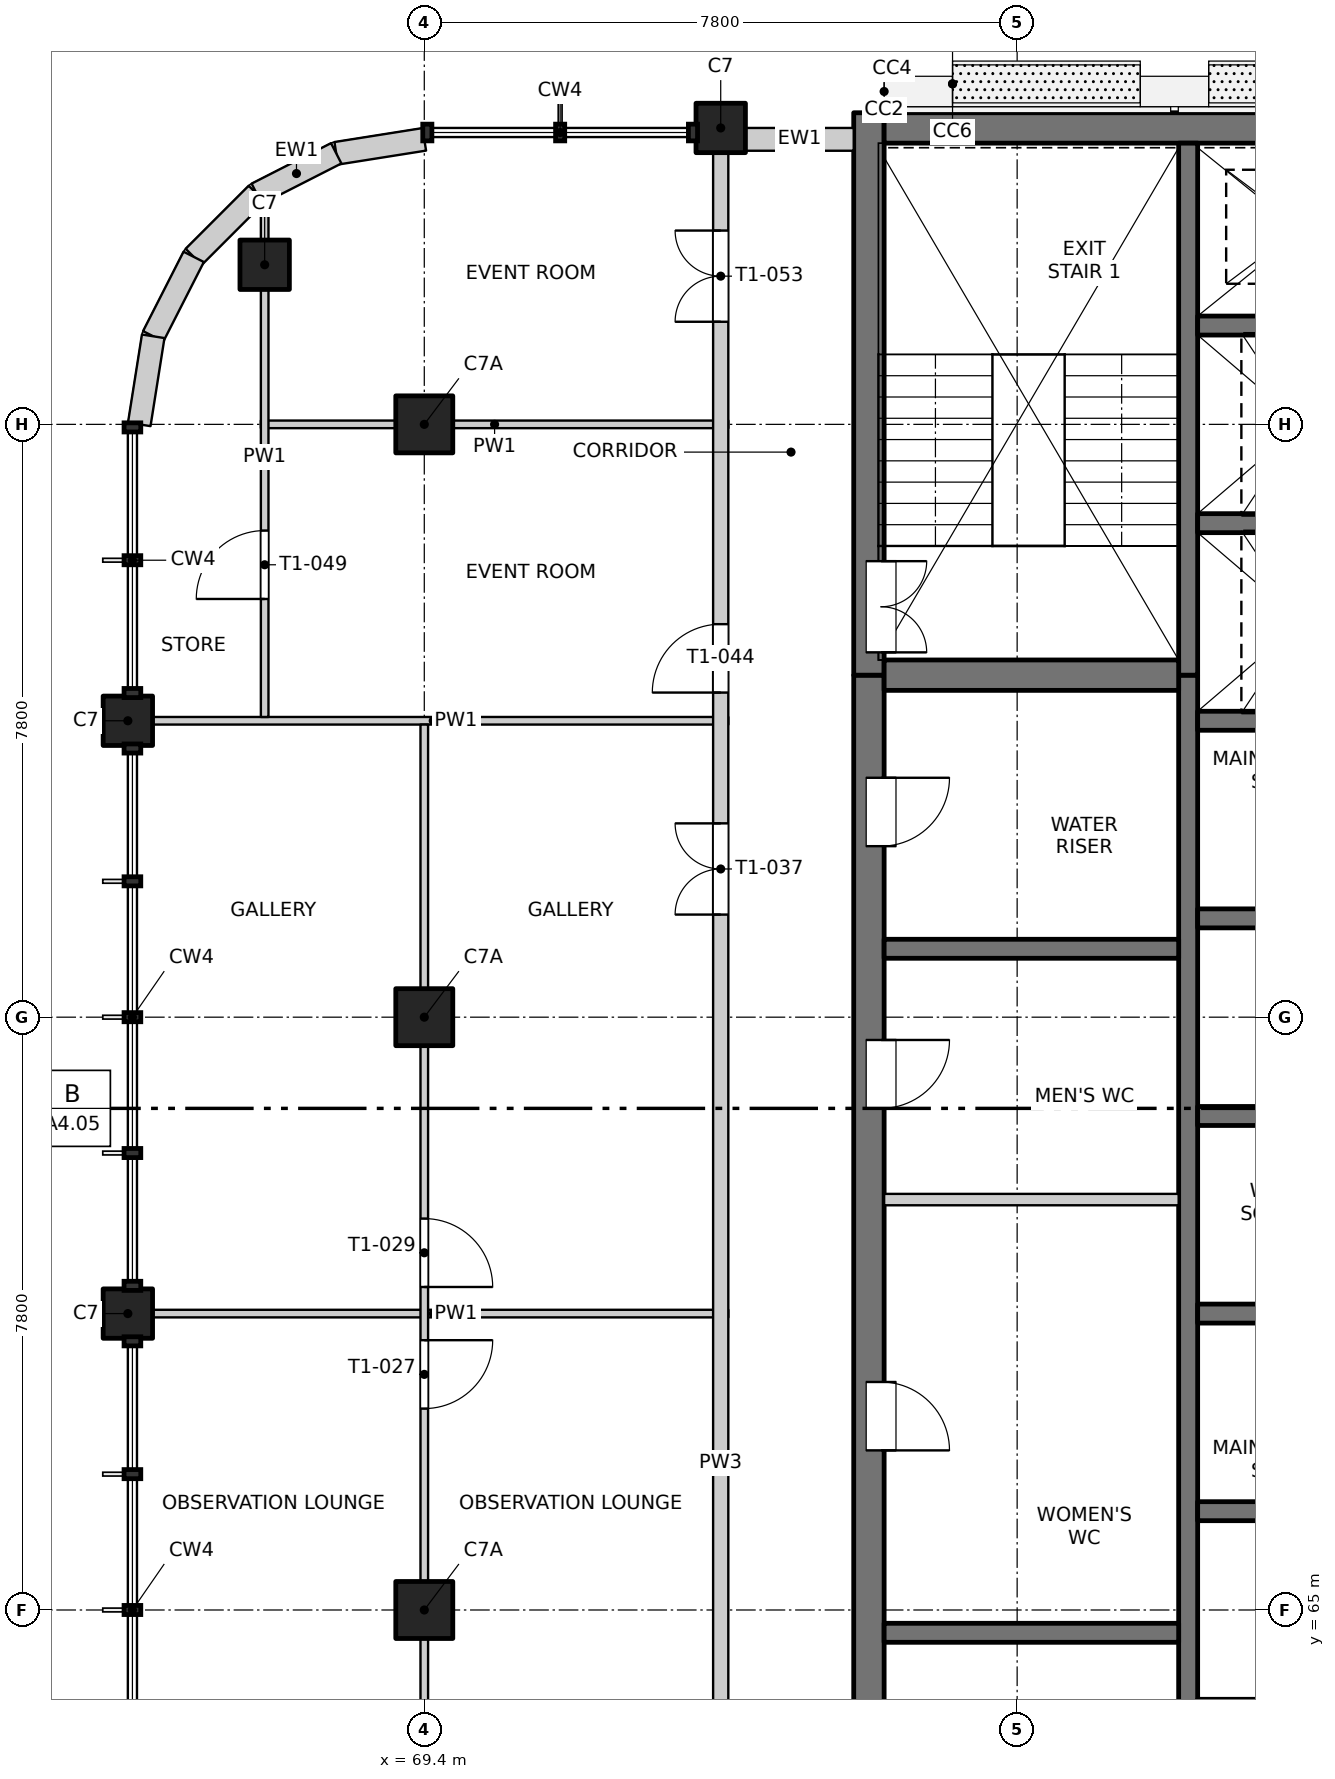
"""IFC4 building model, lengths in metres.
Left out: names, types, materials, properties, quantities, classifications, styles, units other than length and angle.
Written with IfcOpenShell. Run it as: python <this file> out.ifc"""

import sys

from ifc_helpers import new_model, si_unit, direction, frame, frame_2d, origin, origin_2d, place, context, subcontext, project, spatial, rectangle, extrude, element, fill, save


model = new_model("IFC4")
c1 = context("Model", 3, precision=1e-05, world=origin(), true_north=direction((0.0, 1.0)))
c2 = subcontext(c1, "Body", "Model", "MODEL_VIEW")
j1 = project(units=[si_unit("LENGTHUNIT", "METRE"), si_unit("PLANEANGLEUNIT", "RADIAN")], contexts=[c1])
p1 = place(None, origin())
s1 = spatial("IfcSite", under=j1, at=p1, CompositionType="ELEMENT")
p2 = place(p1, origin())
s2 = spatial("IfcBuilding", under=s1, at=p2, CompositionType="ELEMENT")
p3 = place(p2, frame((0.0, 0.0, 263.0)))
s3 = spatial("IfcBuildingStorey", under=s2, at=p3, CompositionType="ELEMENT", Elevation=263.0)
for number, where, z_axis, x_axis in (
    (1, (67.3, 82.7, -0.25), (0.0, 0.0, 1.0), (1.0, 0.0, 0.0)),
    (2, (73.3, 84.5, -0.25), (0.0, 0.0, 1.0), (1.0, 0.0, 0.0)),
    (3, (65.5, 68.9, -0.25), (0.0, 0.0, 1.0), (1.0, 0.0, 0.0)),
    (4, (65.5, 76.7, -0.25), (0.0, 0.0, 1.0), (1.0, 0.0, 0.0)),
):
    element("IfcColumn", number, at=place(p3, frame(where, z_axis=z_axis, x_axis=x_axis)), inside=s3, PredefinedType="COLUMN", context=c2, shape_type="SweptSolid", body=[
        extrude(rectangle(XDim=0.65, YDim=0.65, at=origin_2d()), origin(), (0.0, 0.0, 1.0), 3.35),
    ])
for number, where, z_axis, x_axis in (
    (5, (69.4, 65.0, -0.25), (0.0, 0.0, 1.0), (1.0, 0.0, 0.0)),
    (6, (69.4, 72.8, -0.25), (0.0, 0.0, 1.0), (1.0, 0.0, 0.0)),
    (7, (69.4, 80.6, -0.25), (0.0, 0.0, 1.0), (1.0, 0.0, 0.0)),
):
    element("IfcColumn", number, at=place(p3, frame(where, z_axis=z_axis, x_axis=x_axis)), inside=s3, PredefinedType="COLUMN", context=c2, shape_type="SweptSolid", body=[
        extrude(rectangle(XDim=0.75, YDim=0.75, at=origin_2d()), origin(), (0.0, 0.0, 1.0), 3.35),
    ])
p4 = place(p3, frame((75.25, 55.05, -0.25), z_axis=(0.0, 0.0, 1.0), x_axis=(0.0, 1.0, 0.0)))
e8 = element("IfcWall", 8, at=p4, inside=s3, PredefinedType="SOLIDWALL", context=c2, shape_type="SweptSolid", body=[
    extrude(rectangle(XDim=22.25, YDim=0.4, at=frame_2d((11.125, 0.0))), origin(), (0.0, 0.0, 1.0), 3.35),
])
p5 = place(p4, frame((7.4, 0.0, 0.25)))
e9 = element("IfcOpeningElement", 9, at=p5, cuts=e8, PredefinedType="OPENING", context=c2, shape_type="SweptSolid", body=[
    extrude(rectangle(XDim=0.9, YDim=2.1, at=frame_2d((0.45, 1.05))), frame((0.0, 0.21, 0.0), z_axis=(0.0, -1.0, 0.0), x_axis=(1.0, 0.0, 0.0)), (0.0, 0.0, 1.0), 0.42),
])
p6 = place(p4, frame((12.05, 0.0, 0.25)))
e10 = element("IfcOpeningElement", 10, at=p6, cuts=e8, PredefinedType="OPENING", context=c2, shape_type="SweptSolid", body=[
    extrude(rectangle(XDim=0.9, YDim=2.1, at=frame_2d((0.45, 1.05))), frame((0.0, 0.21, 0.0), z_axis=(0.0, -1.0, 0.0), x_axis=(1.0, 0.0, 0.0)), (0.0, 0.0, 1.0), 0.42),
])
p7 = place(p4, frame((16.55, 0.0, 0.25)))
e11 = element("IfcOpeningElement", 11, at=p7, cuts=e8, PredefinedType="OPENING", context=c2, shape_type="SweptSolid", body=[
    extrude(rectangle(XDim=0.9, YDim=2.1, at=frame_2d((0.45, 1.05))), frame((0.0, 0.21, 0.0), z_axis=(0.0, -1.0, 0.0), x_axis=(1.0, 0.0, 0.0)), (0.0, 0.0, 1.0), 0.42),
])
p8 = place(p4, frame((20.0, 0.0, 0.25)))
e12 = element("IfcOpeningElement", 12, at=p8, cuts=e8, PredefinedType="OPENING", context=c2, shape_type="SweptSolid", body=[
    extrude(rectangle(XDim=0.9, YDim=2.1, at=frame_2d((0.45, 1.05))), frame((0.0, 0.21, 0.0), z_axis=(0.0, -1.0, 0.0), x_axis=(1.0, 0.0, 0.0)), (0.0, 0.0, 1.0), 0.42),
])
p9 = place(p3, frame((75.25, 77.3, -0.25), z_axis=(0.0, 0.0, 1.0), x_axis=(0.0, 1.0, 0.0)))
e13 = element("IfcWall", 13, at=p9, inside=s3, PredefinedType="SOLIDWALL", context=c2, shape_type="SweptSolid", body=[
    extrude(rectangle(XDim=7.4, YDim=0.4, at=frame_2d((3.7, 0.0))), origin(), (0.0, 0.0, 1.0), 3.35),
])
p10 = place(p9, frame((0.3, 0.0, 0.25)))
e14 = element("IfcOpeningElement", 14, at=p10, cuts=e13, PredefinedType="OPENING", context=c2, shape_type="SweptSolid", body=[
    extrude(rectangle(XDim=1.2, YDim=2.1, at=frame_2d((0.6, 1.05))), frame((0.0, 0.21, 0.0), z_axis=(0.0, -1.0, 0.0), x_axis=(1.0, 0.0, 0.0)), (0.0, 0.0, 1.0), 0.42),
])
p11 = place(p3, frame((75.45, 84.5, -0.25), z_axis=(0.0, 0.0, 1.0), x_axis=(1.0, 0.0, 0.0)))
e15 = element("IfcWall", 15, at=p11, inside=s3, PredefinedType="SOLIDWALL", context=c2, shape_type="SweptSolid", body=[
    extrude(rectangle(XDim=19.1, YDim=0.4, at=frame_2d((9.55, 0.0))), origin(), (0.0, 0.0, 1.0), 3.35),
])
p12 = place(p3, frame((79.45, 60.975, -0.25), z_axis=(0.0, 0.0, 1.0), x_axis=(0.0, 1.0, 0.0)))
e16 = element("IfcWall", 16, at=p12, inside=s3, PredefinedType="SOLIDWALL", context=c2, shape_type="SweptSolid", body=[
    extrude(rectangle(XDim=16.325, YDim=0.25, at=frame_2d((8.163, 0.0))), origin(), (0.0, 0.0, 1.0), 3.35),
])
p13 = place(p3, frame((79.45, 77.3, -0.25), z_axis=(0.0, 0.0, 1.0), x_axis=(0.0, 1.0, 0.0)))
e17 = element("IfcWall", 17, at=p13, inside=s3, PredefinedType="SOLIDWALL", context=c2, shape_type="SweptSolid", body=[
    extrude(rectangle(XDim=7.0, YDim=0.25, at=frame_2d((3.5, 0.0))), origin(), (0.0, 0.0, 1.0), 3.35),
])
for number, where, z_axis, x_axis in (
    (18, (79.575, 66.3, -0.25), (0.0, 0.0, 1.0), (1.0, 0.0, 0.0)),
    (19, (79.575, 68.9, -0.25), (0.0, 0.0, 1.0), (1.0, 0.0, 0.0)),
    (20, (79.575, 71.5, -0.25), (0.0, 0.0, 1.0), (1.0, 0.0, 0.0)),
    (21, (79.575, 74.1, -0.25), (0.0, 0.0, 1.0), (1.0, 0.0, 0.0)),
    (22, (79.575, 76.7, -0.25), (0.0, 0.0, 1.0), (1.0, 0.0, 0.0)),
    (23, (79.575, 79.3, -0.25), (0.0, 0.0, 1.0), (1.0, 0.0, 0.0)),
    (24, (79.575, 81.9, -0.25), (0.0, 0.0, 1.0), (1.0, 0.0, 0.0)),
):
    element("IfcWall", number, at=place(p3, frame(where, z_axis=z_axis, x_axis=x_axis)), inside=s3, PredefinedType="SOLIDWALL", context=c2, shape_type="SweptSolid", body=[
        extrude(rectangle(XDim=3.0, YDim=0.25, at=frame_2d((1.5, 0.0))), origin(), (0.0, 0.0, 1.0), 3.35),
    ])
for number, where, z_axis, x_axis in (
    (25, (75.45, 64.7, -0.25), (0.0, 0.0, 1.0), (1.0, 0.0, 0.0)),
    (26, (75.45, 73.7, -0.25), (0.0, 0.0, 1.0), (1.0, 0.0, 0.0)),
):
    element("IfcWall", number, at=place(p3, frame(where, z_axis=z_axis, x_axis=x_axis)), inside=s3, PredefinedType="SOLIDWALL", context=c2, shape_type="SweptSolid", body=[
        extrude(rectangle(XDim=3.875, YDim=0.25, at=frame_2d((1.938, 0.0))), origin(), (0.0, 0.0, 1.0), 3.35),
    ])
p14 = place(p3, frame((75.45, 77.3, -0.25), z_axis=(0.0, 0.0, 1.0), x_axis=(1.0, 0.0, 0.0)))
e27 = element("IfcWall", 27, at=p14, inside=s3, PredefinedType="SOLIDWALL", context=c2, shape_type="SweptSolid", body=[
    extrude(rectangle(XDim=3.875, YDim=0.4, at=frame_2d((1.938, 0.0))), origin(), (0.0, 0.0, 1.0), 3.35),
])
p15 = place(p3, frame((73.625, 84.35, 0.0), z_axis=(0.0, 0.0, 1.0), x_axis=(1.0, 0.0, 0.0)))
e28 = element("IfcWall", 28, at=p15, inside=s3, PredefinedType="SOLIDWALL", context=c2, shape_type="SweptSolid", body=[
    extrude(rectangle(XDim=1.425, YDim=0.3, at=frame_2d((0.712, 0.0))), origin(), (0.0, 0.0, 1.0), 3.1),
])
p16 = place(p3, frame((69.4, 84.35, 0.0), z_axis=(0.0, 0.0, 1.0), x_axis=(-0.987678452879, -0.156496880861, 0.0)))
e29 = element("IfcWall", 29, at=p16, inside=s3, PredefinedType="SOLIDWALL", context=c2, shape_type="SweptSolid", body=[
    extrude(rectangle(XDim=1.173, YDim=0.3, at=frame_2d((0.586, 0.0))), origin(), (0.0, 0.0, 1.0), 3.1),
])
p17 = place(p3, frame((68.241, 84.167, 0.0), z_axis=(0.0, 0.0, 1.0), x_axis=(-0.890988677504, -0.454025524128, 0.0)))
e30 = element("IfcWall", 30, at=p17, inside=s3, PredefinedType="SOLIDWALL", context=c2, shape_type="SweptSolid", body=[
    extrude(rectangle(XDim=1.173, YDim=0.3, at=frame_2d((0.587, 0.0))), origin(), (0.0, 0.0, 1.0), 3.1),
])
p18 = place(p3, frame((67.196, 83.634, 0.0), z_axis=(0.0, 0.0, 1.0), x_axis=(-0.707106781187, -0.707106781187, 0.0)))
e31 = element("IfcWall", 31, at=p18, inside=s3, PredefinedType="SOLIDWALL", context=c2, shape_type="SweptSolid", body=[
    extrude(rectangle(XDim=1.173, YDim=0.3, at=frame_2d((0.586, 0.0))), origin(), (0.0, 0.0, 1.0), 3.1),
])
p19 = place(p3, frame((66.366, 82.804, 0.0), z_axis=(0.0, 0.0, 1.0), x_axis=(-0.454025524128, -0.890988677504, 0.0)))
e32 = element("IfcWall", 32, at=p19, inside=s3, PredefinedType="SOLIDWALL", context=c2, shape_type="SweptSolid", body=[
    extrude(rectangle(XDim=1.173, YDim=0.3, at=frame_2d((0.587, 0.0))), origin(), (0.0, 0.0, 1.0), 3.1),
])
p20 = place(p3, frame((65.833, 81.759, 0.0), z_axis=(0.0, 0.0, 1.0), x_axis=(-0.156496880861, -0.987678452879, 0.0)))
e33 = element("IfcWall", 33, at=p20, inside=s3, PredefinedType="SOLIDWALL", context=c2, shape_type="SweptSolid", body=[
    extrude(rectangle(XDim=1.173, YDim=0.3, at=frame_2d((0.586, 0.0))), origin(), (0.0, 0.0, 1.0), 3.1),
])
p21 = place(p3, frame((65.635, 68.9, 0.0), z_axis=(0.0, 0.0, 1.0), x_axis=(1.0, 0.0, 0.0)))
e34 = element("IfcWall", 34, at=p21, inside=s3, PredefinedType="PARTITIONING", context=c2, shape_type="SweptSolid", body=[
    extrude(rectangle(XDim=7.765, YDim=0.1, at=frame_2d((3.883, 0.0))), origin(), (0.0, 0.0, 1.0), 3.1),
])
p22 = place(p3, frame((75.45, 70.4, 0.0), z_axis=(0.0, 0.0, 1.0), x_axis=(1.0, 0.0, 0.0)))
e35 = element("IfcWall", 35, at=p22, inside=s3, PredefinedType="PARTITIONING", context=c2, shape_type="SweptSolid", body=[
    extrude(rectangle(XDim=3.875, YDim=0.15, at=frame_2d((1.938, 0.0))), origin(), (0.0, 0.0, 1.0), 3.1),
])
p23 = place(p3, frame((65.635, 76.7, 0.0), z_axis=(0.0, 0.0, 1.0), x_axis=(1.0, 0.0, 0.0)))
e36 = element("IfcWall", 36, at=p23, inside=s3, PredefinedType="PARTITIONING", context=c2, shape_type="SweptSolid", body=[
    extrude(rectangle(XDim=7.765, YDim=0.1, at=frame_2d((3.883, 0.0))), origin(), (0.0, 0.0, 1.0), 3.1),
])
p24 = place(p3, frame((67.25, 80.6, 0.0), z_axis=(0.0, 0.0, 1.0), x_axis=(1.0, 0.0, 0.0)))
e37 = element("IfcWall", 37, at=p24, inside=s3, PredefinedType="PARTITIONING", context=c2, shape_type="SweptSolid", body=[
    extrude(rectangle(XDim=6.15, YDim=0.1, at=frame_2d((3.075, 0.0))), origin(), (0.0, 0.0, 1.0), 3.1),
])
p25 = place(p3, frame((67.3, 76.75, 0.0), z_axis=(0.0, 0.0, 1.0), x_axis=(0.0, 1.0, 0.0)))
e38 = element("IfcWall", 38, at=p25, inside=s3, PredefinedType="PARTITIONING", context=c2, shape_type="SweptSolid", body=[
    extrude(rectangle(XDim=6.84, YDim=0.1, at=frame_2d((3.42, 0.0))), origin(), (0.0, 0.0, 1.0), 3.1),
])
p26 = place(p25, frame((1.553, 0.0, 0.0)))
e39 = element("IfcOpeningElement", 39, at=p26, cuts=e38, PredefinedType="OPENING", context=c2, shape_type="SweptSolid", body=[
    extrude(rectangle(XDim=0.9, YDim=2.1, at=frame_2d((0.45, 1.05))), frame((0.0, 0.06, 0.0), z_axis=(0.0, -1.0, 0.0), x_axis=(1.0, 0.0, 0.0)), (0.0, 0.0, 1.0), 0.12),
])
p27 = place(p3, frame((69.4, 47.35, 0.0), z_axis=(0.0, 0.0, 1.0), x_axis=(0.0, 1.0, 0.0)))
e40 = element("IfcWall", 40, at=p27, inside=s3, PredefinedType="PARTITIONING", context=c2, shape_type="SweptSolid", body=[
    extrude(rectangle(XDim=29.3, YDim=0.1, at=frame_2d((14.65, 0.0))), origin(), (0.0, 0.0, 1.0), 3.1),
])
p28 = place(p27, frame((5.35, 0.0, 0.0)))
e41 = element("IfcOpeningElement", 41, at=p28, cuts=e40, PredefinedType="OPENING", context=c2, shape_type="SweptSolid", body=[
    extrude(rectangle(XDim=1.2, YDim=2.1, at=frame_2d((0.6, 1.05))), frame((0.0, 0.06, 0.0), z_axis=(0.0, -1.0, 0.0), x_axis=(1.0, 0.0, 0.0)), (0.0, 0.0, 1.0), 0.12),
])
p29 = place(p27, frame((20.3, 0.0, 0.0)))
e42 = element("IfcOpeningElement", 42, at=p29, cuts=e40, PredefinedType="OPENING", context=c2, shape_type="SweptSolid", body=[
    extrude(rectangle(XDim=0.9, YDim=2.1, at=frame_2d((0.45, 1.05))), frame((0.0, 0.06, 0.0), z_axis=(0.0, -1.0, 0.0), x_axis=(1.0, 0.0, 0.0)), (0.0, 0.0, 1.0), 0.12),
])
p30 = place(p27, frame((21.9, 0.0, 0.0)))
e43 = element("IfcOpeningElement", 43, at=p30, cuts=e40, PredefinedType="OPENING", context=c2, shape_type="SweptSolid", body=[
    extrude(rectangle(XDim=0.9, YDim=2.1, at=frame_2d((0.45, 1.05))), frame((0.0, 0.06, 0.0), z_axis=(0.0, -1.0, 0.0), x_axis=(1.0, 0.0, 0.0)), (0.0, 0.0, 1.0), 0.12),
])
p31 = place(p3, frame((73.3, 49.5, 0.0), z_axis=(0.0, 0.0, 1.0), x_axis=(0.0, 1.0, 0.0)))
e44 = element("IfcWall", 44, at=p31, inside=s3, PredefinedType="PARTITIONING", context=c2, shape_type="SweptSolid", body=[
    extrude(rectangle(XDim=34.865, YDim=0.2, at=frame_2d((17.433, 0.0))), origin(), (0.0, 0.0, 1.0), 3.1),
])
p32 = place(p31, frame((6.2, 0.0, 0.0)))
e45 = element("IfcOpeningElement", 45, at=p32, cuts=e44, PredefinedType="OPENING", context=c2, shape_type="SweptSolid", body=[
    extrude(rectangle(XDim=1.2, YDim=2.1, at=frame_2d((0.6, 1.05))), frame((0.0, 0.11, 0.0), z_axis=(0.0, -1.0, 0.0), x_axis=(1.0, 0.0, 0.0)), (0.0, 0.0, 1.0), 0.22),
])
p33 = place(p31, frame((12.95, 0.0, 0.0)))
e46 = element("IfcOpeningElement", 46, at=p33, cuts=e44, PredefinedType="OPENING", context=c2, shape_type="SweptSolid", body=[
    extrude(rectangle(XDim=1.2, YDim=2.1, at=frame_2d((0.6, 1.05))), frame((0.0, 0.11, 0.0), z_axis=(0.0, -1.0, 0.0), x_axis=(1.0, 0.0, 0.0)), (0.0, 0.0, 1.0), 0.22),
])
p34 = place(p31, frame((24.65, 0.0, 0.0)))
e47 = element("IfcOpeningElement", 47, at=p34, cuts=e44, PredefinedType="OPENING", context=c2, shape_type="SweptSolid", body=[
    extrude(rectangle(XDim=1.2, YDim=2.1, at=frame_2d((0.6, 1.05))), frame((0.0, 0.11, 0.0), z_axis=(0.0, -1.0, 0.0), x_axis=(1.0, 0.0, 0.0)), (0.0, 0.0, 1.0), 0.22),
])
p35 = place(p31, frame((27.571, 0.0, 0.0)))
e48 = element("IfcOpeningElement", 48, at=p35, cuts=e44, PredefinedType="OPENING", context=c2, shape_type="SweptSolid", body=[
    extrude(rectangle(XDim=0.9, YDim=2.1, at=frame_2d((0.45, 1.05))), frame((0.0, 0.11, 0.0), z_axis=(0.0, -1.0, 0.0), x_axis=(1.0, 0.0, 0.0)), (0.0, 0.0, 1.0), 0.22),
])
p36 = place(p31, frame((32.45, 0.0, 0.0)))
e49 = element("IfcOpeningElement", 49, at=p36, cuts=e44, PredefinedType="OPENING", context=c2, shape_type="SweptSolid", body=[
    extrude(rectangle(XDim=1.2, YDim=2.1, at=frame_2d((0.6, 1.05))), frame((0.0, 0.11, 0.0), z_axis=(0.0, -1.0, 0.0), x_axis=(1.0, 0.0, 0.0)), (0.0, 0.0, 1.0), 0.22),
])
p37 = place(p6, origin())
e50 = element("IfcDoor", 50, at=p37, inside=s3, OperationType="SINGLE_SWING_RIGHT", PredefinedType="DOOR", context=c2, shape_type="SweptSolid", body=[
    extrude(rectangle(XDim=0.9, YDim=2.1, at=frame_2d((0.45, 1.05))), frame((0.0, -0.135, 0.0), z_axis=(0.0, -1.0, 0.0), x_axis=(1.0, 0.0, 0.0)), (0.0, 0.0, 1.0), 0.05),
])
fill(e10, e50)
p38 = place(p29, origin())
e51 = element("IfcDoor", 51, at=p38, inside=s3, OperationType="SINGLE_SWING_LEFT", PredefinedType="DOOR", context=c2, shape_type="SweptSolid", body=[
    extrude(rectangle(XDim=0.9, YDim=2.1, at=frame_2d((0.45, 1.05))), frame((0.0, 0.025, 0.0), z_axis=(0.0, -1.0, 0.0), x_axis=(1.0, 0.0, 0.0)), (0.0, 0.0, 1.0), 0.05),
])
fill(e42, e51)
p39 = place(p30, origin())
e52 = element("IfcDoor", 52, at=p39, inside=s3, OperationType="SINGLE_SWING_RIGHT", PredefinedType="DOOR", context=c2, shape_type="SweptSolid", body=[
    extrude(rectangle(XDim=0.9, YDim=2.1, at=frame_2d((0.45, 1.05))), frame((0.0, 0.025, 0.0), z_axis=(0.0, -1.0, 0.0), x_axis=(1.0, 0.0, 0.0)), (0.0, 0.0, 1.0), 0.05),
])
fill(e43, e52)
p40 = place(p7, origin())
e53 = element("IfcDoor", 53, at=p40, inside=s3, OperationType="SINGLE_SWING_LEFT", PredefinedType="DOOR", context=c2, shape_type="SweptSolid", body=[
    extrude(rectangle(XDim=0.9, YDim=2.1, at=frame_2d((0.45, 1.05))), frame((0.0, -0.135, 0.0), z_axis=(0.0, -1.0, 0.0), x_axis=(1.0, 0.0, 0.0)), (0.0, 0.0, 1.0), 0.05),
])
fill(e11, e53)
p41 = place(p34, origin())
e54 = element("IfcDoor", 54, at=p41, inside=s3, OperationType="DOUBLE_DOOR_SINGLE_SWING", PredefinedType="DOOR", context=c2, shape_type="SweptSolid", body=[
    extrude(rectangle(XDim=1.2, YDim=2.1, at=frame_2d((0.6, 1.05))), frame((0.0, 0.025, 0.0), z_axis=(0.0, -1.0, 0.0), x_axis=(1.0, 0.0, 0.0)), (0.0, 0.0, 1.0), 0.05),
])
fill(e47, e54)
p42 = place(p8, origin())
e55 = element("IfcDoor", 55, at=p42, inside=s3, OperationType="SINGLE_SWING_LEFT", PredefinedType="DOOR", context=c2, shape_type="SweptSolid", body=[
    extrude(rectangle(XDim=0.9, YDim=2.1, at=frame_2d((0.45, 1.05))), frame((0.0, -0.135, 0.0), z_axis=(0.0, -1.0, 0.0), x_axis=(1.0, 0.0, 0.0)), (0.0, 0.0, 1.0), 0.05),
])
fill(e12, e55)
p43 = place(p35, origin())
e56 = element("IfcDoor", 56, at=p43, inside=s3, OperationType="SINGLE_SWING_LEFT", PredefinedType="DOOR", context=c2, shape_type="SweptSolid", body=[
    extrude(rectangle(XDim=0.9, YDim=2.1, at=frame_2d((0.45, 1.05))), frame((0.0, 0.025, 0.0), z_axis=(0.0, -1.0, 0.0), x_axis=(1.0, 0.0, 0.0)), (0.0, 0.0, 1.0), 0.05),
])
fill(e48, e56)
p44 = place(p10, origin())
e57 = element("IfcDoor", 57, at=p44, inside=s3, OperationType="DOUBLE_DOOR_SINGLE_SWING", PredefinedType="DOOR", context=c2, shape_type="SweptSolid", body=[
    extrude(rectangle(XDim=1.2, YDim=2.1, at=frame_2d((0.6, 1.05))), frame((0.0, -0.135, 0.0), z_axis=(0.0, -1.0, 0.0), x_axis=(1.0, 0.0, 0.0)), (0.0, 0.0, 1.0), 0.05),
])
fill(e14, e57)
p45 = place(p26, origin())
e58 = element("IfcDoor", 58, at=p45, inside=s3, OperationType="SINGLE_SWING_LEFT", PredefinedType="DOOR", context=c2, shape_type="SweptSolid", body=[
    extrude(rectangle(XDim=0.9, YDim=2.1, at=frame_2d((0.45, 1.05))), frame((0.0, 0.025, 0.0), z_axis=(0.0, -1.0, 0.0), x_axis=(1.0, 0.0, 0.0)), (0.0, 0.0, 1.0), 0.05),
])
fill(e39, e58)
p46 = place(p36, origin())
e59 = element("IfcDoor", 59, at=p46, inside=s3, OperationType="DOUBLE_DOOR_SINGLE_SWING", PredefinedType="DOOR", context=c2, shape_type="SweptSolid", body=[
    extrude(rectangle(XDim=1.2, YDim=2.1, at=frame_2d((0.6, 1.05))), frame((0.0, 0.025, 0.0), z_axis=(0.0, -1.0, 0.0), x_axis=(1.0, 0.0, 0.0)), (0.0, 0.0, 1.0), 0.05),
])
fill(e49, e59)
save(model, sys.argv[1])
